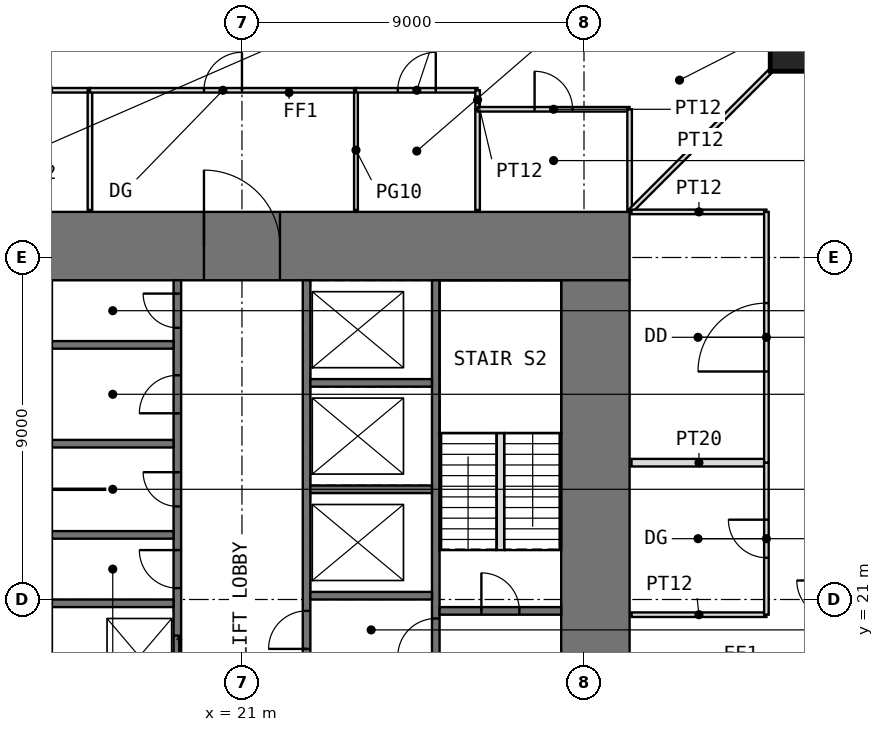
"""IFC4 building model, lengths in metres.
Left out: names, types, materials, properties, quantities, classifications, styles, units other than length and angle.
Written with IfcOpenShell. Run it as: python <this file> out.ifc"""

import sys

from ifc_helpers import new_model, si_unit, direction, frame, frame_2d, origin, origin_2d, place, context, subcontext, project, spatial, rectangle, extrude, element, fill, save


model = new_model("IFC4")
c1 = context("Model", 3, precision=1e-05, world=origin(), true_north=direction((0.0, 1.0)))
c2 = subcontext(c1, "Body", "Model", "MODEL_VIEW")
j1 = project(units=[si_unit("LENGTHUNIT", "METRE"), si_unit("PLANEANGLEUNIT", "RADIAN")], contexts=[c1])
p1 = place(None, origin())
s1 = spatial("IfcSite", under=j1, at=p1, CompositionType="ELEMENT")
p2 = place(p1, origin())
s2 = spatial("IfcBuilding", under=s1, at=p2, CompositionType="ELEMENT")
p3 = place(p2, frame((0.0, 0.0, 62.5)))
s3 = spatial("IfcBuildingStorey", under=s2, at=p3, CompositionType="ELEMENT", Elevation=62.5)
p4 = place(p3, frame((35.45, 35.45, 0.0), z_axis=(0.0, 0.0, 1.0), x_axis=(1.0, 0.0, 0.0)))
e1 = element("IfcColumn", 1, at=p4, inside=s3, PredefinedType="COLUMN", context=c2, shape_type="SweptSolid", body=[
    extrude(rectangle(XDim=1.1, YDim=1.1, at=origin_2d()), origin(), (0.0, 0.0, 1.0), 4.0),
])
p5 = place(p3, frame((10.8, 30.3, -0.05), z_axis=(0.0, 0.0, 1.0), x_axis=(1.0, 0.0, 0.0)))
e2 = element("IfcWall", 2, at=p5, inside=s3, PredefinedType="SHEAR", context=c2, shape_type="SweptSolid", body=[
    extrude(rectangle(XDim=20.4, YDim=1.8, at=frame_2d((10.2, 0.0))), origin(), (0.0, 0.0, 1.0), 4.0),
])
p6 = place(p5, frame((9.2, 0.0, 0.05)))
e3 = element("IfcOpeningElement", 3, at=p6, cuts=e2, PredefinedType="OPENING", context=c2, shape_type="SweptSolid", body=[
    extrude(rectangle(XDim=2.0, YDim=2.2, at=frame_2d((1.0, 1.1))), frame((0.0, 0.91, 0.0), z_axis=(0.0, -1.0, 0.0), x_axis=(1.0, 0.0, 0.0)), (0.0, 0.0, 1.0), 1.82),
])
p7 = place(p3, frame((30.3, 12.6, -0.05), z_axis=(0.0, 0.0, 1.0), x_axis=(0.0, 1.0, 0.0)))
e4 = element("IfcWall", 4, at=p7, inside=s3, PredefinedType="SHEAR", context=c2, shape_type="SweptSolid", body=[
    extrude(rectangle(XDim=16.8, YDim=1.8, at=frame_2d((8.4, 0.0))), origin(), (0.0, 0.0, 1.0), 4.0),
])
p8 = place(p7, frame((5.9, 0.0, 0.05)))
e5 = element("IfcOpeningElement", 5, at=p8, cuts=e4, PredefinedType="OPENING", context=c2, shape_type="SweptSolid", body=[
    extrude(rectangle(XDim=1.0, YDim=2.2, at=frame_2d((0.5, 1.1))), frame((0.0, 0.91, 0.0), z_axis=(0.0, -1.0, 0.0), x_axis=(1.0, 0.0, 0.0)), (0.0, 0.0, 1.0), 1.82),
])
p9 = place(p3, frame((19.3, 12.6, -0.05), z_axis=(0.0, 0.0, 1.0), x_axis=(0.0, 1.0, 0.0)))
e6 = element("IfcWall", 6, at=p9, inside=s3, PredefinedType="SHEAR", context=c2, shape_type="SweptSolid", body=[
    extrude(rectangle(XDim=16.8, YDim=0.2, at=frame_2d((8.4, 0.0))), origin(), (0.0, 0.0, 1.0), 4.0),
])
p10 = place(p9, frame((8.7, 0.0, 0.05)))
e7 = element("IfcOpeningElement", 7, at=p10, cuts=e6, PredefinedType="OPENING", context=c2, shape_type="SweptSolid", body=[
    extrude(rectangle(XDim=1.0, YDim=2.2, at=frame_2d((0.5, 1.1))), frame((0.0, 0.11, 0.0), z_axis=(0.0, -1.0, 0.0), x_axis=(1.0, 0.0, 0.0)), (0.0, 0.0, 1.0), 0.22),
])
p11 = place(p9, frame((10.85, 0.0, 0.05)))
e8 = element("IfcOpeningElement", 8, at=p11, cuts=e6, PredefinedType="OPENING", context=c2, shape_type="SweptSolid", body=[
    extrude(rectangle(XDim=0.9, YDim=2.2, at=frame_2d((0.45, 1.1))), frame((0.0, 0.11, 0.0), z_axis=(0.0, -1.0, 0.0), x_axis=(1.0, 0.0, 0.0)), (0.0, 0.0, 1.0), 0.22),
])
p12 = place(p9, frame((13.3, 0.0, 0.05)))
e9 = element("IfcOpeningElement", 9, at=p12, cuts=e6, PredefinedType="OPENING", context=c2, shape_type="SweptSolid", body=[
    extrude(rectangle(XDim=1.0, YDim=2.2, at=frame_2d((0.5, 1.1))), frame((0.0, 0.11, 0.0), z_axis=(0.0, -1.0, 0.0), x_axis=(1.0, 0.0, 0.0)), (0.0, 0.0, 1.0), 0.22),
])
p13 = place(p9, frame((15.55, 0.0, 0.05)))
e10 = element("IfcOpeningElement", 10, at=p13, cuts=e6, PredefinedType="OPENING", context=c2, shape_type="SweptSolid", body=[
    extrude(rectangle(XDim=0.9, YDim=2.2, at=frame_2d((0.45, 1.1))), frame((0.0, 0.11, 0.0), z_axis=(0.0, -1.0, 0.0), x_axis=(1.0, 0.0, 0.0)), (0.0, 0.0, 1.0), 0.22),
])
p14 = place(p9, frame((0.75, 0.0, 0.05)))
e11 = element("IfcOpeningElement", 11, at=p14, cuts=e6, PredefinedType="OPENING", context=c2, shape_type="SweptSolid", body=[
    extrude(rectangle(XDim=1.1, YDim=2.2, at=frame_2d((0.55, 1.1))), frame((0.0, 0.11, 0.0), z_axis=(0.0, -1.0, 0.0), x_axis=(1.0, 0.0, 0.0)), (0.0, 0.0, 1.0), 0.22),
])
p15 = place(p9, frame((3.55, 0.0, 0.05)))
e12 = element("IfcOpeningElement", 12, at=p15, cuts=e6, PredefinedType="OPENING", context=c2, shape_type="SweptSolid", body=[
    extrude(rectangle(XDim=1.1, YDim=2.2, at=frame_2d((0.55, 1.1))), frame((0.0, 0.11, 0.0), z_axis=(0.0, -1.0, 0.0), x_axis=(1.0, 0.0, 0.0)), (0.0, 0.0, 1.0), 0.22),
])
p16 = place(p9, frame((6.35, 0.0, 0.05)))
e13 = element("IfcOpeningElement", 13, at=p16, cuts=e6, PredefinedType="OPENING", context=c2, shape_type="SweptSolid", body=[
    extrude(rectangle(XDim=1.1, YDim=2.2, at=frame_2d((0.55, 1.1))), frame((0.0, 0.11, 0.0), z_axis=(0.0, -1.0, 0.0), x_axis=(1.0, 0.0, 0.0)), (0.0, 0.0, 1.0), 0.22),
])
p17 = place(p3, frame((22.7, 12.6, -0.05), z_axis=(0.0, 0.0, 1.0), x_axis=(0.0, 1.0, 0.0)))
e14 = element("IfcWall", 14, at=p17, inside=s3, PredefinedType="SHEAR", context=c2, shape_type="SweptSolid", body=[
    extrude(rectangle(XDim=16.8, YDim=0.2, at=frame_2d((8.4, 0.0))), origin(), (0.0, 0.0, 1.0), 4.0),
])
p18 = place(p17, frame((0.45, 0.0, 0.05)))
e15 = element("IfcOpeningElement", 15, at=p18, cuts=e14, PredefinedType="OPENING", context=c2, shape_type="SweptSolid", body=[
    extrude(rectangle(XDim=0.9, YDim=2.2, at=frame_2d((0.45, 1.1))), frame((0.0, 0.11, 0.0), z_axis=(0.0, -1.0, 0.0), x_axis=(1.0, 0.0, 0.0)), (0.0, 0.0, 1.0), 0.22),
])
p19 = place(p17, frame((7.1, 0.0, 0.05)))
e16 = element("IfcOpeningElement", 16, at=p19, cuts=e14, PredefinedType="OPENING", context=c2, shape_type="SweptSolid", body=[
    extrude(rectangle(XDim=1.0, YDim=2.2, at=frame_2d((0.5, 1.1))), frame((0.0, 0.11, 0.0), z_axis=(0.0, -1.0, 0.0), x_axis=(1.0, 0.0, 0.0)), (0.0, 0.0, 1.0), 0.22),
])
p20 = place(p17, frame((1.95, 0.0, 0.05)))
e17 = element("IfcOpeningElement", 17, at=p20, cuts=e14, PredefinedType="OPENING", context=c2, shape_type="SweptSolid", body=[
    extrude(rectangle(XDim=0.9, YDim=2.2, at=frame_2d((0.45, 1.1))), frame((0.0, 0.11, 0.0), z_axis=(0.0, -1.0, 0.0), x_axis=(1.0, 0.0, 0.0)), (0.0, 0.0, 1.0), 0.22),
])
p21 = place(p17, frame((4.95, 0.0, 0.05)))
e18 = element("IfcOpeningElement", 18, at=p21, cuts=e14, PredefinedType="OPENING", context=c2, shape_type="SweptSolid", body=[
    extrude(rectangle(XDim=0.9, YDim=2.2, at=frame_2d((0.45, 1.1))), frame((0.0, 0.11, 0.0), z_axis=(0.0, -1.0, 0.0), x_axis=(1.0, 0.0, 0.0)), (0.0, 0.0, 1.0), 0.22),
])
p22 = place(p3, frame((26.1, 12.6, -0.05), z_axis=(0.0, 0.0, 1.0), x_axis=(0.0, 1.0, 0.0)))
e19 = element("IfcWall", 19, at=p22, inside=s3, PredefinedType="SHEAR", context=c2, shape_type="SweptSolid", body=[
    extrude(rectangle(XDim=16.8, YDim=0.2, at=frame_2d((8.4, 0.0))), origin(), (0.0, 0.0, 1.0), 4.0),
])
p23 = place(p22, frame((6.9, 0.0, 0.05)))
e20 = element("IfcOpeningElement", 20, at=p23, cuts=e19, PredefinedType="OPENING", context=c2, shape_type="SweptSolid", body=[
    extrude(rectangle(XDim=1.0, YDim=2.2, at=frame_2d((0.5, 1.1))), frame((0.0, 0.11, 0.0), z_axis=(0.0, -1.0, 0.0), x_axis=(1.0, 0.0, 0.0)), (0.0, 0.0, 1.0), 0.22),
])
for number, where, z_axis, x_axis in (
    (21, (16.0, 20.9, -0.05), (0.0, 0.0, 1.0), (1.0, 0.0, 0.0)),
    (22, (16.0, 22.7, -0.05), (0.0, 0.0, 1.0), (1.0, 0.0, 0.0)),
    (23, (16.0, 25.1, -0.05), (0.0, 0.0, 1.0), (1.0, 0.0, 0.0)),
    (24, (16.0, 27.7, -0.05), (0.0, 0.0, 1.0), (1.0, 0.0, 0.0)),
    (25, (22.8, 21.1, -0.05), (0.0, 0.0, 1.0), (1.0, 0.0, 0.0)),
    (26, (22.8, 23.9, -0.05), (0.0, 0.0, 1.0), (1.0, 0.0, 0.0)),
    (27, (22.8, 26.7, -0.05), (0.0, 0.0, 1.0), (1.0, 0.0, 0.0)),
):
    element("IfcWall", number, at=place(p3, frame(where, z_axis=z_axis, x_axis=x_axis)), inside=s3, PredefinedType="SHEAR", context=c2, shape_type="SweptSolid", body=[
        extrude(rectangle(XDim=3.2, YDim=0.2, at=frame_2d((1.6, 0.0))), origin(), (0.0, 0.0, 1.0), 4.0),
    ])
p24 = place(p3, frame((26.2, 20.7, -0.05), z_axis=(0.0, 0.0, 1.0), x_axis=(1.0, 0.0, 0.0)))
e28 = element("IfcWall", 28, at=p24, inside=s3, PredefinedType="SHEAR", context=c2, shape_type="SweptSolid", body=[
    extrude(rectangle(XDim=3.2, YDim=0.2, at=frame_2d((1.6, 0.0))), origin(), (0.0, 0.0, 1.0), 4.0),
])
p25 = place(p24, frame((1.1, 0.0, 0.05)))
e29 = element("IfcOpeningElement", 29, at=p25, cuts=e28, PredefinedType="OPENING", context=c2, shape_type="SweptSolid", body=[
    extrude(rectangle(XDim=1.0, YDim=2.2, at=frame_2d((0.5, 1.1))), frame((0.0, 0.11, 0.0), z_axis=(0.0, -1.0, 0.0), x_axis=(1.0, 0.0, 0.0)), (0.0, 0.0, 1.0), 0.22),
])
p26 = place(p3, frame((16.0, 23.9, 0.0), z_axis=(0.0, 0.0, 1.0), x_axis=(1.0, 0.0, 0.0)))
e30 = element("IfcWall", 30, at=p26, inside=s3, PredefinedType="PARTITIONING", context=c2, shape_type="SweptSolid", body=[
    extrude(rectangle(XDim=1.4, YDim=0.03, at=frame_2d((0.7, 0.0))), origin(), (0.0, 0.0, 1.0), 3.75),
])
p27 = place(p3, frame((14.0, 34.4, 0.0), z_axis=(0.0, 0.0, 1.0), x_axis=(1.0, 0.0, 0.0)))
e31 = element("IfcWall", 31, at=p27, inside=s3, PredefinedType="PARTITIONING", context=c2, shape_type="SweptSolid", body=[
    extrude(rectangle(XDim=3.0, YDim=0.12, at=frame_2d((1.5, 0.0))), origin(), (0.0, 0.0, 1.0), 3.75),
])
p28 = place(p27, frame((1.0, 0.0, 0.0)))
e32 = element("IfcOpeningElement", 32, at=p28, cuts=e31, PredefinedType="OPENING", context=c2, shape_type="SweptSolid", body=[
    extrude(rectangle(XDim=1.0, YDim=2.2, at=frame_2d((0.5, 1.1))), frame((0.0, 0.07, 0.0), z_axis=(0.0, -1.0, 0.0), x_axis=(1.0, 0.0, 0.0)), (0.0, 0.0, 1.0), 0.14),
])
p29 = place(p3, frame((17.0, 31.25, 0.0), z_axis=(0.0, 0.0, 1.0), x_axis=(0.0, 1.0, 0.0)))
e33 = element("IfcWall", 33, at=p29, inside=s3, PredefinedType="PARTITIONING", context=c2, shape_type="SweptSolid", body=[
    extrude(rectangle(XDim=3.15, YDim=0.12, at=frame_2d((1.575, 0.0))), origin(), (0.0, 0.0, 1.0), 3.75),
])
p30 = place(p3, frame((17.0, 34.4, 0.0), z_axis=(0.0, 0.0, 1.0), x_axis=(1.0, 0.0, 0.0)))
e34 = element("IfcWall", 34, at=p30, inside=s3, PredefinedType="PARTITIONING", context=c2, shape_type="SweptSolid", body=[
    extrude(rectangle(XDim=7.0, YDim=0.12, at=frame_2d((3.5, 0.0))), origin(), (0.0, 0.0, 1.0), 3.75),
])
p31 = place(p30, frame((3.0, 0.0, 0.0)))
e35 = element("IfcOpeningElement", 35, at=p31, cuts=e34, PredefinedType="OPENING", context=c2, shape_type="SweptSolid", body=[
    extrude(rectangle(XDim=1.0, YDim=2.4, at=frame_2d((0.5, 1.2))), frame((0.0, 0.07, 0.0), z_axis=(0.0, -1.0, 0.0), x_axis=(1.0, 0.0, 0.0)), (0.0, 0.0, 1.0), 0.14),
])
p32 = place(p3, frame((24.0, 31.25, 0.0), z_axis=(0.0, 0.0, 1.0), x_axis=(0.0, 1.0, 0.0)))
e36 = element("IfcWall", 36, at=p32, inside=s3, PredefinedType="PARTITIONING", context=c2, shape_type="SweptSolid", body=[
    extrude(rectangle(XDim=3.15, YDim=0.1, at=frame_2d((1.575, 0.0))), origin(), (0.0, 0.0, 1.0), 3.75),
])
p33 = place(p3, frame((24.0, 34.4, 0.0), z_axis=(0.0, 0.0, 1.0), x_axis=(1.0, 0.0, 0.0)))
e37 = element("IfcWall", 37, at=p33, inside=s3, PredefinedType="PARTITIONING", context=c2, shape_type="SweptSolid", body=[
    extrude(rectangle(XDim=3.2, YDim=0.12, at=frame_2d((1.6, 0.0))), origin(), (0.0, 0.0, 1.0), 3.75),
])
p34 = place(p33, frame((1.1, 0.0, 0.0)))
e38 = element("IfcOpeningElement", 38, at=p34, cuts=e37, PredefinedType="OPENING", context=c2, shape_type="SweptSolid", body=[
    extrude(rectangle(XDim=1.0, YDim=2.4, at=frame_2d((0.5, 1.2))), frame((0.0, 0.07, 0.0), z_axis=(0.0, -1.0, 0.0), x_axis=(1.0, 0.0, 0.0)), (0.0, 0.0, 1.0), 0.14),
])
p35 = place(p3, frame((27.2, 31.25, 0.0), z_axis=(0.0, 0.0, 1.0), x_axis=(0.0, 1.0, 0.0)))
e39 = element("IfcWall", 39, at=p35, inside=s3, PredefinedType="PARTITIONING", context=c2, shape_type="SweptSolid", body=[
    extrude(rectangle(XDim=2.65, YDim=0.12, at=frame_2d((1.325, 0.0))), origin(), (0.0, 0.0, 1.0), 3.75),
])
p36 = place(p3, frame((27.2, 33.9, 0.0), z_axis=(0.0, 0.0, 1.0), x_axis=(0.0, 1.0, 0.0)))
e40 = element("IfcWall", 40, at=p36, inside=s3, PredefinedType="PARTITIONING", context=c2, shape_type="SweptSolid", body=[
    extrude(rectangle(XDim=0.5, YDim=0.12, at=frame_2d((0.25, 0.0))), origin(), (0.0, 0.0, 1.0), 3.75),
])
p37 = place(p3, frame((27.2, 33.9, 0.0), z_axis=(0.0, 0.0, 1.0), x_axis=(1.0, 0.0, 0.0)))
e41 = element("IfcWall", 41, at=p37, inside=s3, PredefinedType="PARTITIONING", context=c2, shape_type="SweptSolid", body=[
    extrude(rectangle(XDim=4.0, YDim=0.12, at=frame_2d((2.0, 0.0))), origin(), (0.0, 0.0, 1.0), 3.75),
])
p38 = place(p37, frame((1.5, 0.0, 0.0)))
e42 = element("IfcOpeningElement", 42, at=p38, cuts=e41, PredefinedType="OPENING", context=c2, shape_type="SweptSolid", body=[
    extrude(rectangle(XDim=1.0, YDim=2.2, at=frame_2d((0.5, 1.1))), frame((0.0, 0.07, 0.0), z_axis=(0.0, -1.0, 0.0), x_axis=(1.0, 0.0, 0.0)), (0.0, 0.0, 1.0), 0.14),
])
p39 = place(p3, frame((31.2, 31.25, 0.0), z_axis=(0.0, 0.0, 1.0), x_axis=(0.0, 1.0, 0.0)))
e43 = element("IfcWall", 43, at=p39, inside=s3, PredefinedType="PARTITIONING", context=c2, shape_type="SweptSolid", body=[
    extrude(rectangle(XDim=2.65, YDim=0.12, at=frame_2d((1.325, 0.0))), origin(), (0.0, 0.0, 1.0), 3.75),
])
p40 = place(p3, frame((31.235, 31.235, 0.0), z_axis=(0.0, 0.0, 1.0), x_axis=(0.707106781187, 0.707106781187, 0.0)))
e44 = element("IfcWall", 44, at=p40, inside=s3, PredefinedType="PARTITIONING", context=c2, shape_type="SweptSolid", body=[
    extrude(rectangle(XDim=5.168, YDim=0.12, at=frame_2d((2.584, 0.0))), origin(), (0.0, 0.0, 1.0), 3.75),
])
p41 = place(p3, frame((31.25, 20.6, 0.0), z_axis=(0.0, 0.0, 1.0), x_axis=(1.0, 0.0, 0.0)))
e45 = element("IfcWall", 45, at=p41, inside=s3, PredefinedType="PARTITIONING", context=c2, shape_type="SweptSolid", body=[
    extrude(rectangle(XDim=3.55, YDim=0.12, at=frame_2d((1.775, 0.0))), origin(), (0.0, 0.0, 1.0), 3.75),
])
p42 = place(p3, frame((31.25, 24.6, 0.0), z_axis=(0.0, 0.0, 1.0), x_axis=(1.0, 0.0, 0.0)))
e46 = element("IfcWall", 46, at=p42, inside=s3, PredefinedType="PARTITIONING", context=c2, shape_type="SweptSolid", body=[
    extrude(rectangle(XDim=3.55, YDim=0.2, at=frame_2d((1.775, 0.0))), origin(), (0.0, 0.0, 1.0), 3.75),
])
p43 = place(p3, frame((31.25, 31.2, 0.0), z_axis=(0.0, 0.0, 1.0), x_axis=(1.0, 0.0, 0.0)))
e47 = element("IfcWall", 47, at=p43, inside=s3, PredefinedType="PARTITIONING", context=c2, shape_type="SweptSolid", body=[
    extrude(rectangle(XDim=3.55, YDim=0.12, at=frame_2d((1.775, 0.0))), origin(), (0.0, 0.0, 1.0), 3.75),
])
p44 = place(p3, frame((34.8, 20.6, 0.0), z_axis=(0.0, 0.0, 1.0), x_axis=(0.0, 1.0, 0.0)))
e48 = element("IfcWall", 48, at=p44, inside=s3, PredefinedType="PARTITIONING", context=c2, shape_type="SweptSolid", body=[
    extrude(rectangle(XDim=4.0, YDim=0.12, at=frame_2d((2.0, 0.0))), origin(), (0.0, 0.0, 1.0), 3.75),
])
p45 = place(p44, frame((1.5, 0.0, 0.0)))
e49 = element("IfcOpeningElement", 49, at=p45, cuts=e48, PredefinedType="OPENING", context=c2, shape_type="SweptSolid", body=[
    extrude(rectangle(XDim=1.0, YDim=2.4, at=frame_2d((0.5, 1.2))), frame((0.0, 0.07, 0.0), z_axis=(0.0, -1.0, 0.0), x_axis=(1.0, 0.0, 0.0)), (0.0, 0.0, 1.0), 0.14),
])
p46 = place(p3, frame((34.8, 24.6, 0.0), z_axis=(0.0, 0.0, 1.0), x_axis=(0.0, 1.0, 0.0)))
e50 = element("IfcWall", 50, at=p46, inside=s3, PredefinedType="PARTITIONING", context=c2, shape_type="SweptSolid", body=[
    extrude(rectangle(XDim=6.6, YDim=0.12, at=frame_2d((3.3, 0.0))), origin(), (0.0, 0.0, 1.0), 3.75),
])
p47 = place(p46, frame((2.4, 0.0, 0.0)))
e51 = element("IfcOpeningElement", 51, at=p47, cuts=e50, PredefinedType="OPENING", context=c2, shape_type="SweptSolid", body=[
    extrude(rectangle(XDim=1.8, YDim=2.4, at=frame_2d((0.9, 1.2))), frame((0.0, 0.07, 0.0), z_axis=(0.0, -1.0, 0.0), x_axis=(1.0, 0.0, 0.0)), (0.0, 0.0, 1.0), 0.14),
])
p48 = place(p3, frame((27.8, 22.3, 0.0), z_axis=(0.0, 0.0, 1.0), x_axis=(0.0, 1.0, 0.0)))
e52 = element("IfcWall", 52, at=p48, inside=s3, PredefinedType="PARTITIONING", context=c2, shape_type="SweptSolid", body=[
    extrude(rectangle(XDim=3.08, YDim=0.2, at=frame_2d((1.54, 0.0))), origin(), (0.0, 0.0, 1.0), 4.0),
])
p49 = place(p6, origin())
e53 = element("IfcDoor", 53, at=p49, inside=s3, OperationType="DOUBLE_DOOR_SINGLE_SWING", PredefinedType="DOOR", context=c2, shape_type="SweptSolid", body=[
    extrude(rectangle(XDim=2.0, YDim=2.2, at=frame_2d((1.0, 1.1))), frame((0.0, 0.025, 0.0), z_axis=(0.0, -1.0, 0.0), x_axis=(1.0, 0.0, 0.0)), (0.0, 0.0, 1.0), 0.05),
])
fill(e3, e53)
p50 = place(p25, origin())
e54 = element("IfcDoor", 54, at=p50, inside=s3, OperationType="SINGLE_SWING_LEFT", PredefinedType="DOOR", context=c2, shape_type="SweptSolid", body=[
    extrude(rectangle(XDim=1.0, YDim=2.2, at=frame_2d((0.5, 1.1))), frame((0.0, 0.025, 0.0), z_axis=(0.0, -1.0, 0.0), x_axis=(1.0, 0.0, 0.0)), (0.0, 0.0, 1.0), 0.05),
])
fill(e29, e54)
p51 = place(p23, origin())
e55 = element("IfcDoor", 55, at=p51, inside=s3, OperationType="SINGLE_SWING_LEFT", PredefinedType="DOOR", context=c2, shape_type="SweptSolid", body=[
    extrude(rectangle(XDim=1.0, YDim=2.2, at=frame_2d((0.5, 1.1))), frame((0.0, 0.025, 0.0), z_axis=(0.0, -1.0, 0.0), x_axis=(1.0, 0.0, 0.0)), (0.0, 0.0, 1.0), 0.05),
])
fill(e20, e55)
p52 = place(p10, origin())
e56 = element("IfcDoor", 56, at=p52, inside=s3, OperationType="SINGLE_SWING_RIGHT", PredefinedType="DOOR", context=c2, shape_type="SweptSolid", body=[
    extrude(rectangle(XDim=1.0, YDim=2.2, at=frame_2d((0.5, 1.1))), frame((0.0, 0.025, 0.0), z_axis=(0.0, -1.0, 0.0), x_axis=(1.0, 0.0, 0.0)), (0.0, 0.0, 1.0), 0.05),
])
fill(e7, e56)
p53 = place(p19, origin())
e57 = element("IfcDoor", 57, at=p53, inside=s3, OperationType="SINGLE_SWING_LEFT", PredefinedType="DOOR", context=c2, shape_type="SweptSolid", body=[
    extrude(rectangle(XDim=1.0, YDim=2.2, at=frame_2d((0.5, 1.1))), frame((0.0, 0.025, 0.0), z_axis=(0.0, -1.0, 0.0), x_axis=(1.0, 0.0, 0.0)), (0.0, 0.0, 1.0), 0.05),
])
fill(e16, e57)
p54 = place(p11, origin())
e58 = element("IfcDoor", 58, at=p54, inside=s3, OperationType="SINGLE_SWING_RIGHT", PredefinedType="DOOR", context=c2, shape_type="SweptSolid", body=[
    extrude(rectangle(XDim=0.9, YDim=2.2, at=frame_2d((0.45, 1.1))), frame((0.0, 0.025, 0.0), z_axis=(0.0, -1.0, 0.0), x_axis=(1.0, 0.0, 0.0)), (0.0, 0.0, 1.0), 0.05),
])
fill(e8, e58)
p55 = place(p12, origin())
e59 = element("IfcDoor", 59, at=p55, inside=s3, OperationType="SINGLE_SWING_LEFT", PredefinedType="DOOR", context=c2, shape_type="SweptSolid", body=[
    extrude(rectangle(XDim=1.0, YDim=2.2, at=frame_2d((0.5, 1.1))), frame((0.0, 0.025, 0.0), z_axis=(0.0, -1.0, 0.0), x_axis=(1.0, 0.0, 0.0)), (0.0, 0.0, 1.0), 0.05),
])
fill(e9, e59)
p56 = place(p13, origin())
e60 = element("IfcDoor", 60, at=p56, inside=s3, OperationType="SINGLE_SWING_RIGHT", PredefinedType="DOOR", context=c2, shape_type="SweptSolid", body=[
    extrude(rectangle(XDim=0.9, YDim=2.2, at=frame_2d((0.45, 1.1))), frame((0.0, 0.025, 0.0), z_axis=(0.0, -1.0, 0.0), x_axis=(1.0, 0.0, 0.0)), (0.0, 0.0, 1.0), 0.05),
])
fill(e10, e60)
p57 = place(p45, origin())
e61 = element("IfcDoor", 61, at=p57, inside=s3, OperationType="SINGLE_SWING_RIGHT", PredefinedType="DOOR", context=c2, shape_type="SweptSolid", body=[
    extrude(rectangle(XDim=1.0, YDim=2.4, at=frame_2d((0.5, 1.2))), frame((0.0, 0.025, 0.0), z_axis=(0.0, -1.0, 0.0), x_axis=(1.0, 0.0, 0.0)), (0.0, 0.0, 1.0), 0.05),
])
fill(e49, e61)
p58 = place(p47, origin())
e62 = element("IfcDoor", 62, at=p58, inside=s3, OperationType="DOUBLE_DOOR_SINGLE_SWING", PredefinedType="DOOR", context=c2, shape_type="SweptSolid", body=[
    extrude(rectangle(XDim=1.8, YDim=2.4, at=frame_2d((0.9, 1.2))), frame((0.0, 0.025, 0.0), z_axis=(0.0, -1.0, 0.0), x_axis=(1.0, 0.0, 0.0)), (0.0, 0.0, 1.0), 0.05),
])
fill(e51, e62)
p59 = place(p34, origin())
e63 = element("IfcDoor", 63, at=p59, inside=s3, OperationType="SINGLE_SWING_RIGHT", PredefinedType="DOOR", context=c2, shape_type="SweptSolid", body=[
    extrude(rectangle(XDim=1.0, YDim=2.4, at=frame_2d((0.5, 1.2))), frame((0.0, 0.025, 0.0), z_axis=(0.0, -1.0, 0.0), x_axis=(1.0, 0.0, 0.0)), (0.0, 0.0, 1.0), 0.05),
])
fill(e38, e63)
p60 = place(p38, origin())
e64 = element("IfcDoor", 64, at=p60, inside=s3, OperationType="SINGLE_SWING_LEFT", PredefinedType="DOOR", context=c2, shape_type="SweptSolid", body=[
    extrude(rectangle(XDim=1.0, YDim=2.2, at=frame_2d((0.5, 1.1))), frame((0.0, 0.025, 0.0), z_axis=(0.0, -1.0, 0.0), x_axis=(1.0, 0.0, 0.0)), (0.0, 0.0, 1.0), 0.05),
])
fill(e42, e64)
p61 = place(p31, origin())
e65 = element("IfcDoor", 65, at=p61, inside=s3, OperationType="SINGLE_SWING_RIGHT", PredefinedType="DOOR", context=c2, shape_type="SweptSolid", body=[
    extrude(rectangle(XDim=1.0, YDim=2.4, at=frame_2d((0.5, 1.2))), frame((0.0, 0.025, 0.0), z_axis=(0.0, -1.0, 0.0), x_axis=(1.0, 0.0, 0.0)), (0.0, 0.0, 1.0), 0.05),
])
fill(e35, e65)
p62 = place(p16, origin())
e66 = element("IfcDoor", 66, at=p62, inside=s3, OperationType="DOUBLE_DOOR_SLIDING", PredefinedType="DOOR", context=c2, shape_type="SweptSolid", body=[
    extrude(rectangle(XDim=1.1, YDim=2.2, at=frame_2d((0.55, 1.1))), frame((0.0, 0.025, 0.0), z_axis=(0.0, -1.0, 0.0), x_axis=(1.0, 0.0, 0.0)), (0.0, 0.0, 1.0), 0.05),
])
fill(e13, e66)
save(model, sys.argv[1])
